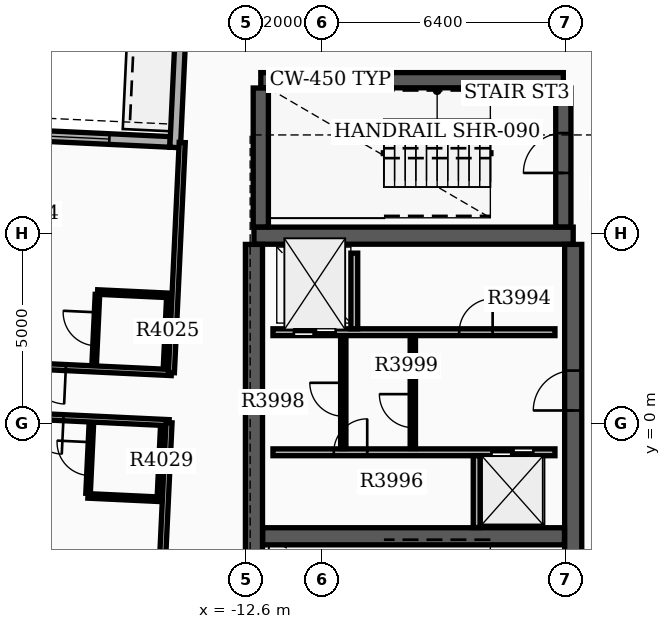
"""IFC4 building model, lengths in metres.
Left out: names, types, materials, properties, quantities, classifications, styles, units other than length and angle.
Written with IfcOpenShell. Run it as: python <this file> out.ifc"""

import sys

from ifc_helpers import new_model, si_unit, direction, frame, frame_2d, origin, place, context, subcontext, project, spatial, rectangle, extrude, element, fill, save


model = new_model("IFC4")
c1 = context("Model", 3, precision=1e-05, world=origin(), true_north=direction((0.0, 1.0)))
c2 = subcontext(c1, "Body", "Model", "MODEL_VIEW")
j1 = project(units=[si_unit("LENGTHUNIT", "METRE"), si_unit("PLANEANGLEUNIT", "RADIAN")], contexts=[c1])
p1 = place(None, origin())
s1 = spatial("IfcSite", under=j1, at=p1, CompositionType="ELEMENT")
p2 = place(p1, origin())
s2 = spatial("IfcBuilding", under=s1, at=p2, CompositionType="ELEMENT")
p3 = place(p2, frame((0.0, 0.0, 253.8)))
s3 = spatial("IfcBuildingStorey", under=s2, at=p3, CompositionType="ELEMENT", Elevation=253.8)
p4 = place(p3, frame((-12.4, 4.95, 0.0), z_axis=(0.0, 0.0, 1.0), x_axis=(1.0, 0.0, 0.0)))
e1 = element("IfcWall", 1, at=p4, inside=s3, PredefinedType="SHEAR", context=c2, shape_type="SweptSolid", body=[
    extrude(rectangle(XDim=8.4, YDim=0.45, at=frame_2d((4.2, 0.0))), origin(), (0.0, 0.0, 1.0), 3.7),
])
p5 = place(p3, frame((-12.4, -6.62, 0.0), z_axis=(0.0, 0.0, 1.0), x_axis=(0.0, 1.0, 0.0)))
e2 = element("IfcWall", 2, at=p5, inside=s3, PredefinedType="SHEAR", context=c2, shape_type="SweptSolid", body=[
    extrude(rectangle(XDim=11.34, YDim=0.45, at=frame_2d((5.67, 0.0))), origin(), (0.0, 0.0, 1.0), 3.7),
])
p6 = place(p3, frame((-4.0, -6.62, 0.0), z_axis=(0.0, 0.0, 1.0), x_axis=(0.0, 1.0, 0.0)))
e3 = element("IfcWall", 3, at=p6, inside=s3, PredefinedType="SHEAR", context=c2, shape_type="SweptSolid", body=[
    extrude(rectangle(XDim=11.34, YDim=0.45, at=frame_2d((5.67, 0.0))), origin(), (0.0, 0.0, 1.0), 3.7),
])
p7 = place(p6, frame((1.37, 0.0, 0.0)))
e4 = element("IfcOpeningElement", 4, at=p7, cuts=e3, PredefinedType="OPENING", context=c2, shape_type="SweptSolid", body=[
    extrude(rectangle(XDim=1.05, YDim=2.15, at=frame_2d((0.525, 1.075))), frame((0.0, 0.235, 0.0), z_axis=(0.0, -1.0, 0.0), x_axis=(1.0, 0.0, 0.0)), (0.0, 0.0, 1.0), 0.47),
])
p8 = place(p6, frame((6.97, 0.0, 0.0)))
e5 = element("IfcOpeningElement", 5, at=p8, cuts=e3, PredefinedType="OPENING", context=c2, shape_type="SweptSolid", body=[
    extrude(rectangle(XDim=1.05, YDim=2.15, at=frame_2d((0.525, 1.075))), frame((0.0, 0.235, 0.0), z_axis=(0.0, -1.0, 0.0), x_axis=(1.0, 0.0, 0.0)), (0.0, 0.0, 1.0), 0.47),
])
p9 = place(p3, frame((-12.17, -2.96, 0.0), z_axis=(0.0, 0.0, 1.0), x_axis=(1.0, 0.0, 0.0)))
e6 = element("IfcWall", 6, at=p9, inside=s3, PredefinedType="SHEAR", context=c2, shape_type="SweptSolid", body=[
    extrude(rectangle(XDim=7.94, YDim=0.45, at=frame_2d((3.97, 0.0))), origin(), (0.0, 0.0, 1.0), 3.7),
])
p10 = place(p3, frame((-12.22, 9.04, 0.0), z_axis=(0.0, 0.0, 1.0), x_axis=(1.0, 0.0, 0.0)))
e7 = element("IfcWall", 7, at=p10, inside=s3, PredefinedType="SHEAR", context=c2, shape_type="SweptSolid", body=[
    extrude(rectangle(XDim=7.96, YDim=0.4, at=frame_2d((3.98, 0.0))), origin(), (0.0, 0.0, 1.0), 3.7),
])
p11 = place(p3, frame((-12.22, 5.18, 0.0), z_axis=(0.0, 0.0, 1.0), x_axis=(0.0, 1.0, 0.0)))
e8 = element("IfcWall", 8, at=p11, inside=s3, PredefinedType="SHEAR", context=c2, shape_type="SweptSolid", body=[
    extrude(rectangle(XDim=3.655, YDim=0.4, at=frame_2d((1.828, 0.0))), origin(), (0.0, 0.0, 1.0), 3.7),
])
p12 = place(p3, frame((-4.26, 5.18, 0.0), z_axis=(0.0, 0.0, 1.0), x_axis=(0.0, 1.0, 0.0)))
e9 = element("IfcWall", 9, at=p12, inside=s3, PredefinedType="SHEAR", context=c2, shape_type="SweptSolid", body=[
    extrude(rectangle(XDim=3.655, YDim=0.4, at=frame_2d((1.828, 0.0))), origin(), (0.0, 0.0, 1.0), 3.7),
])
p13 = place(p12, frame((1.42, 0.0, 0.0)))
e10 = element("IfcOpeningElement", 10, at=p13, cuts=e9, PredefinedType="OPENING", context=c2, shape_type="SweptSolid", body=[
    extrude(rectangle(XDim=1.05, YDim=2.15, at=frame_2d((0.525, 1.075))), frame((0.0, 0.21, 0.0), z_axis=(0.0, -1.0, 0.0), x_axis=(1.0, 0.0, 0.0)), (0.0, 0.0, 1.0), 0.42),
])
p14 = place(p3, frame((-14.607, 7.416, 0.0), z_axis=(0.0, 0.0, 1.0), x_axis=(-0.998889342735, 0.047117735191, 0.0)))
e11 = element("IfcWall", 11, at=p14, inside=s3, PredefinedType="STANDARD", context=c2, shape_type="SweptSolid", body=[
    extrude(rectangle(XDim=14.7, YDim=0.28, at=frame_2d((7.35, 0.0))), origin(), (0.0, 0.0, 1.0), 3.18),
])
p15 = place(p14, frame((1.6, 0.0, 0.8)))
e12 = element("IfcOpeningElement", 12, at=p15, cuts=e11, PredefinedType="OPENING", context=c2, shape_type="SweptSolid", body=[
    extrude(rectangle(XDim=1.6, YDim=1.7, at=frame_2d((0.8, 0.85))), frame((0.0, 0.15, 0.0), z_axis=(0.0, -1.0, 0.0), x_axis=(1.0, 0.0, 0.0)), (0.0, 0.0, 1.0), 0.3),
])
p16 = place(p14, frame((4.8, 0.0, 0.8)))
e13 = element("IfcOpeningElement", 13, at=p16, cuts=e11, PredefinedType="OPENING", context=c2, shape_type="SweptSolid", body=[
    extrude(rectangle(XDim=1.6, YDim=1.7, at=frame_2d((0.8, 0.85))), frame((0.0, 0.15, 0.0), z_axis=(0.0, -1.0, 0.0), x_axis=(1.0, 0.0, 0.0)), (0.0, 0.0, 1.0), 0.3),
])
p17 = place(p14, frame((8.25, 0.0, 0.8)))
e14 = element("IfcOpeningElement", 14, at=p17, cuts=e11, PredefinedType="OPENING", context=c2, shape_type="SweptSolid", body=[
    extrude(rectangle(XDim=1.6, YDim=1.7, at=frame_2d((0.8, 0.85))), frame((0.0, 0.15, 0.0), z_axis=(0.0, -1.0, 0.0), x_axis=(1.0, 0.0, 0.0)), (0.0, 0.0, 1.0), 0.3),
])
p18 = place(p14, frame((11.45, 0.0, 0.8)))
e15 = element("IfcOpeningElement", 15, at=p18, cuts=e11, PredefinedType="OPENING", context=c2, shape_type="SweptSolid", body=[
    extrude(rectangle(XDim=1.6, YDim=1.7, at=frame_2d((0.8, 0.85))), frame((0.0, 0.15, 0.0), z_axis=(0.0, -1.0, 0.0), x_axis=(1.0, 0.0, 0.0)), (0.0, 0.0, 1.0), 0.3),
])
p19 = place(p3, frame((-14.474, 7.27, 0.0), z_axis=(0.0, 0.0, 1.0), x_axis=(0.04712043756, 0.998889215261, 0.0)))
e16 = element("IfcWall", 16, at=p19, inside=s3, PredefinedType="STANDARD", context=c2, shape_type="SweptSolid", body=[
    extrude(rectangle(XDim=6.86, YDim=0.28, at=frame_2d((3.43, 0.0))), origin(), (0.0, 0.0, 1.0), 3.18),
])
p20 = place(p3, frame((-11.9, 2.41, 0.0), z_axis=(0.0, 0.0, 1.0), x_axis=(1.0, 0.0, 0.0)))
e17 = element("IfcWall", 17, at=p20, inside=s3, PredefinedType="SOLIDWALL", context=c2, shape_type="SweptSolid", body=[
    extrude(rectangle(XDim=7.42, YDim=0.18, at=frame_2d((3.71, 0.0))), origin(), (0.0, 0.0, 1.0), 3.17),
])
p21 = place(p20, frame((0.55, 0.0, 0.0)))
e18 = element("IfcOpeningElement", 18, at=p21, cuts=e17, PredefinedType="OPENING", context=c2, shape_type="SweptSolid", body=[
    extrude(rectangle(XDim=1.1, YDim=2.15, at=frame_2d((0.55, 1.075))), frame((0.0, 0.1, 0.0), z_axis=(0.0, -1.0, 0.0), x_axis=(1.0, 0.0, 0.0)), (0.0, 0.0, 1.0), 0.2),
])
p22 = place(p20, frame((4.9, 0.0, 0.0)))
e19 = element("IfcOpeningElement", 19, at=p22, cuts=e17, PredefinedType="OPENING", context=c2, shape_type="SweptSolid", body=[
    extrude(rectangle(XDim=0.88, YDim=2.1, at=frame_2d((0.44, 1.05))), frame((0.0, 0.1, 0.0), z_axis=(0.0, -1.0, 0.0), x_axis=(1.0, 0.0, 0.0)), (0.0, 0.0, 1.0), 0.2),
])
p23 = place(p3, frame((-11.9, -0.75, 0.0), z_axis=(0.0, 0.0, 1.0), x_axis=(1.0, 0.0, 0.0)))
e20 = element("IfcWall", 20, at=p23, inside=s3, PredefinedType="SOLIDWALL", context=c2, shape_type="SweptSolid", body=[
    extrude(rectangle(XDim=7.42, YDim=0.18, at=frame_2d((3.71, 0.0))), origin(), (0.0, 0.0, 1.0), 3.17),
])
p24 = place(p23, frame((5.75, 0.0, 0.0)))
e21 = element("IfcOpeningElement", 21, at=p24, cuts=e20, PredefinedType="OPENING", context=c2, shape_type="SweptSolid", body=[
    extrude(rectangle(XDim=1.1, YDim=2.15, at=frame_2d((0.55, 1.075))), frame((0.0, 0.1, 0.0), z_axis=(0.0, -1.0, 0.0), x_axis=(1.0, 0.0, 0.0)), (0.0, 0.0, 1.0), 0.2),
])
p25 = place(p23, frame((1.6, 0.0, 0.0)))
e22 = element("IfcOpeningElement", 22, at=p25, cuts=e20, PredefinedType="OPENING", context=c2, shape_type="SweptSolid", body=[
    extrude(rectangle(XDim=0.88, YDim=2.1, at=frame_2d((0.44, 1.05))), frame((0.0, 0.1, 0.0), z_axis=(0.0, -1.0, 0.0), x_axis=(1.0, 0.0, 0.0)), (0.0, 0.0, 1.0), 0.2),
])
p26 = place(p3, frame((-9.76, 2.5, 0.0), z_axis=(0.0, 0.0, 1.0), x_axis=(0.0, 1.0, 0.0)))
e23 = element("IfcWall", 23, at=p26, inside=s3, PredefinedType="SOLIDWALL", context=c2, shape_type="SweptSolid", body=[
    extrude(rectangle(XDim=1.99, YDim=0.18, at=frame_2d((0.995, 0.0))), origin(), (0.0, 0.0, 1.0), 3.17),
])
p27 = place(p3, frame((-6.54, -2.73, 0.0), z_axis=(0.0, 0.0, 1.0), x_axis=(0.0, 1.0, 0.0)))
e24 = element("IfcWall", 24, at=p27, inside=s3, PredefinedType="SOLIDWALL", context=c2, shape_type="SweptSolid", body=[
    extrude(rectangle(XDim=1.89, YDim=0.18, at=frame_2d((0.945, 0.0))), origin(), (0.0, 0.0, 1.0), 3.17),
])
p28 = place(p3, frame((-8.22, -0.65, 0.0), z_axis=(0.0, 0.0, 1.0), x_axis=(0.0, 1.0, 0.0)))
e25 = element("IfcWall", 25, at=p28, inside=s3, PredefinedType="SOLIDWALL", context=c2, shape_type="SweptSolid", body=[
    extrude(rectangle(XDim=2.96, YDim=0.14, at=frame_2d((1.48, 0.0))), origin(), (0.0, 0.0, 1.0), 3.17),
])
p29 = place(p28, frame((0.55, 0.0, 0.0)))
e26 = element("IfcOpeningElement", 26, at=p29, cuts=e25, PredefinedType="OPENING", context=c2, shape_type="SweptSolid", body=[
    extrude(rectangle(XDim=0.88, YDim=2.1, at=frame_2d((0.44, 1.05))), frame((0.0, 0.08, 0.0), z_axis=(0.0, -1.0, 0.0), x_axis=(1.0, 0.0, 0.0)), (0.0, 0.0, 1.0), 0.16),
])
p30 = place(p3, frame((-10.05, -0.652, 0.0), z_axis=(0.0, 0.0, 1.0), x_axis=(0.0, 1.0, 0.0)))
e27 = element("IfcWall", 27, at=p30, inside=s3, PredefinedType="PARTITIONING", context=c2, shape_type="SweptSolid", body=[
    extrude(rectangle(XDim=2.962, YDim=0.14, at=frame_2d((1.481, 0.0))), origin(), (0.0, 0.0, 1.0), 3.17),
])
p31 = place(p30, frame((0.85, 0.0, 0.0)))
e28 = element("IfcOpeningElement", 28, at=p31, cuts=e27, PredefinedType="OPENING", context=c2, shape_type="SweptSolid", body=[
    extrude(rectangle(XDim=0.88, YDim=2.1, at=frame_2d((0.44, 1.05))), frame((0.0, 0.08, 0.0), z_axis=(0.0, -1.0, 0.0), x_axis=(1.0, 0.0, 0.0)), (0.0, 0.0, 1.0), 0.16),
])
p32 = place(p3, frame((-14.573, 1.348, 0.0), z_axis=(0.0, 0.0, 1.0), x_axis=(-0.998889523559, 0.047113901593, 0.0)))
e29 = element("IfcWall", 29, at=p32, inside=s3, PredefinedType="PARTITIONING", context=c2, shape_type="SweptSolid", body=[
    extrude(rectangle(XDim=15.012, YDim=0.16, at=frame_2d((7.506, 0.0))), origin(), (0.0, 0.0, 1.0), 3.17),
])
p33 = place(p32, frame((2.78, 0.0, 0.0)))
e30 = element("IfcOpeningElement", 30, at=p33, cuts=e29, PredefinedType="OPENING", context=c2, shape_type="SweptSolid", body=[
    extrude(rectangle(XDim=0.96, YDim=2.15, at=frame_2d((0.48, 1.075))), frame((0.0, 0.09, 0.0), z_axis=(0.0, -1.0, 0.0), x_axis=(1.0, 0.0, 0.0)), (0.0, 0.0, 1.0), 0.18),
])
p34 = place(p32, frame((13.76, 0.0, 0.0)))
e31 = element("IfcOpeningElement", 31, at=p34, cuts=e29, PredefinedType="OPENING", context=c2, shape_type="SweptSolid", body=[
    extrude(rectangle(XDim=0.96, YDim=2.15, at=frame_2d((0.48, 1.075))), frame((0.0, 0.09, 0.0), z_axis=(0.0, -1.0, 0.0), x_axis=(1.0, 0.0, 0.0)), (0.0, 0.0, 1.0), 0.18),
])
p35 = place(p3, frame((-14.573, 1.348, 0.0), z_axis=(0.0, 0.0, 1.0), x_axis=(0.047136383867, 0.998888462901, 0.0)))
e32 = element("IfcWall", 32, at=p35, inside=s3, PredefinedType="PARTITIONING", context=c2, shape_type="SweptSolid", body=[
    extrude(rectangle(XDim=6.06, YDim=0.16, at=frame_2d((3.03, 0.0))), origin(), (0.0, 0.0, 1.0), 3.17),
])
p36 = place(p3, frame((-16.604, 1.584, 0.0), z_axis=(0.0, 0.0, 1.0), x_axis=(0.047087116047, 0.998890786574, 0.0)))
e33 = element("IfcWall", 33, at=p36, inside=s3, PredefinedType="PARTITIONING", context=c2, shape_type="SweptSolid", body=[
    extrude(rectangle(XDim=1.82, YDim=0.12, at=frame_2d((0.91, 0.0))), origin(), (0.0, 0.0, 1.0), 3.17),
])
p37 = place(p36, frame((0.47, 0.0, 0.0)))
e34 = element("IfcOpeningElement", 34, at=p37, cuts=e33, PredefinedType="OPENING", context=c2, shape_type="SweptSolid", body=[
    extrude(rectangle(XDim=0.88, YDim=2.1, at=frame_2d((0.44, 1.05))), frame((0.0, 0.07, 0.0), z_axis=(0.0, -1.0, 0.0), x_axis=(1.0, 0.0, 0.0)), (0.0, 0.0, 1.0), 0.14),
])
p38 = place(p3, frame((-14.726, 1.495, 0.0), z_axis=(0.0, 0.0, 1.0), x_axis=(0.047087116047, 0.998890786574, 0.0)))
e35 = element("IfcWall", 35, at=p38, inside=s3, PredefinedType="PARTITIONING", context=c2, shape_type="SweptSolid", body=[
    extrude(rectangle(XDim=1.82, YDim=0.12, at=frame_2d((0.91, 0.0))), origin(), (0.0, 0.0, 1.0), 3.17),
])
p39 = place(p3, frame((-14.637, 3.378, 0.0), z_axis=(0.0, 0.0, 1.0), x_axis=(-0.998894138717, 0.04701595088, 0.0)))
e36 = element("IfcWall", 36, at=p39, inside=s3, PredefinedType="PARTITIONING", context=c2, shape_type="SweptSolid", body=[
    extrude(rectangle(XDim=1.88, YDim=0.12, at=frame_2d((0.94, 0.0))), origin(), (0.0, 0.0, 1.0), 3.17),
])
p40 = place(p3, frame((-14.635, 0.029, 0.0), z_axis=(0.0, 0.0, 1.0), x_axis=(-0.998889487459, 0.047114666968, 0.0)))
e37 = element("IfcWall", 37, at=p40, inside=s3, PredefinedType="PARTITIONING", context=c2, shape_type="SweptSolid", body=[
    extrude(rectangle(XDim=15.012, YDim=0.16, at=frame_2d((7.506, 0.0))), origin(), (0.0, 0.0, 1.0), 3.17),
])
p41 = place(p40, frame((2.78, 0.0, 0.0)))
e38 = element("IfcOpeningElement", 38, at=p41, cuts=e37, PredefinedType="OPENING", context=c2, shape_type="SweptSolid", body=[
    extrude(rectangle(XDim=0.96, YDim=2.15, at=frame_2d((0.48, 1.075))), frame((0.0, 0.09, 0.0), z_axis=(0.0, -1.0, 0.0), x_axis=(1.0, 0.0, 0.0)), (0.0, 0.0, 1.0), 0.18),
])
p42 = place(p40, frame((13.76, 0.0, 0.0)))
e39 = element("IfcOpeningElement", 39, at=p42, cuts=e37, PredefinedType="OPENING", context=c2, shape_type="SweptSolid", body=[
    extrude(rectangle(XDim=0.96, YDim=2.15, at=frame_2d((0.48, 1.075))), frame((0.0, 0.09, 0.0), z_axis=(0.0, -1.0, 0.0), x_axis=(1.0, 0.0, 0.0)), (0.0, 0.0, 1.0), 0.18),
])
p43 = place(p3, frame((-14.635, 0.029, 0.0), z_axis=(0.0, 0.0, 1.0), x_axis=(-0.047098081119, -0.998890269627, 0.0)))
e40 = element("IfcWall", 40, at=p43, inside=s3, PredefinedType="PARTITIONING", context=c2, shape_type="SweptSolid", body=[
    extrude(rectangle(XDim=6.06, YDim=0.16, at=frame_2d((3.03, 0.0))), origin(), (0.0, 0.0, 1.0), 3.17),
])
p44 = place(p3, frame((-16.765, -1.832, 0.0), z_axis=(0.0, 0.0, 1.0), x_axis=(0.047087116047, 0.998890786574, 0.0)))
e41 = element("IfcWall", 41, at=p44, inside=s3, PredefinedType="PARTITIONING", context=c2, shape_type="SweptSolid", body=[
    extrude(rectangle(XDim=1.82, YDim=0.12, at=frame_2d((0.91, 0.0))), origin(), (0.0, 0.0, 1.0), 3.17),
])
p45 = place(p44, frame((0.47, 0.0, 0.0)))
e42 = element("IfcOpeningElement", 42, at=p45, cuts=e41, PredefinedType="OPENING", context=c2, shape_type="SweptSolid", body=[
    extrude(rectangle(XDim=0.88, YDim=2.1, at=frame_2d((0.44, 1.05))), frame((0.0, 0.07, 0.0), z_axis=(0.0, -1.0, 0.0), x_axis=(1.0, 0.0, 0.0)), (0.0, 0.0, 1.0), 0.14),
])
p46 = place(p3, frame((-14.887, -1.921, 0.0), z_axis=(0.0, 0.0, 1.0), x_axis=(0.047080807099, 0.998891083954, 0.0)))
e43 = element("IfcWall", 43, at=p46, inside=s3, PredefinedType="PARTITIONING", context=c2, shape_type="SweptSolid", body=[
    extrude(rectangle(XDim=1.82, YDim=0.12, at=frame_2d((0.91, 0.0))), origin(), (0.0, 0.0, 1.0), 3.17),
])
p47 = place(p3, frame((-14.89, -1.986, 0.0), z_axis=(0.0, 0.0, 1.0), x_axis=(-0.998888319371, 0.047139425368, 0.0)))
e44 = element("IfcWall", 44, at=p47, inside=s3, PredefinedType="PARTITIONING", context=c2, shape_type="SweptSolid", body=[
    extrude(rectangle(XDim=1.88, YDim=0.12, at=frame_2d((0.94, 0.0))), origin(), (0.0, 0.0, 1.0), 3.17),
])
p48 = place(p15, origin())
e45 = element("IfcWindow", 45, at=p48, inside=s3, PartitioningType="SINGLE_PANEL", PredefinedType="WINDOW", context=c2, shape_type="SweptSolid", body=[
    extrude(rectangle(XDim=1.6, YDim=1.7, at=frame_2d((0.8, 0.85))), frame((0.0, 0.03, 0.0), z_axis=(0.0, -1.0, 0.0), x_axis=(1.0, 0.0, 0.0)), (0.0, 0.0, 1.0), 0.06),
])
fill(e12, e45)
p49 = place(p8, origin())
e46 = element("IfcDoor", 46, at=p49, inside=s3, OperationType="SINGLE_SWING_LEFT", PredefinedType="DOOR", context=c2, shape_type="SweptSolid", body=[
    extrude(rectangle(XDim=1.05, YDim=2.15, at=frame_2d((0.525, 1.075))), frame((0.0, 0.025, 0.0), z_axis=(0.0, -1.0, 0.0), x_axis=(1.0, 0.0, 0.0)), (0.0, 0.0, 1.0), 0.05),
])
fill(e5, e46)
p50 = place(p13, origin())
e47 = element("IfcDoor", 47, at=p50, inside=s3, OperationType="SINGLE_SWING_LEFT", PredefinedType="DOOR", context=c2, shape_type="SweptSolid", body=[
    extrude(rectangle(XDim=1.05, YDim=2.15, at=frame_2d((0.525, 1.075))), frame((0.0, 0.025, 0.0), z_axis=(0.0, -1.0, 0.0), x_axis=(1.0, 0.0, 0.0)), (0.0, 0.0, 1.0), 0.05),
])
fill(e10, e47)
p51 = place(p21, origin())
e48 = element("IfcDoor", 48, at=p51, inside=s3, OperationType="DOUBLE_DOOR_SLIDING", PredefinedType="DOOR", context=c2, shape_type="SweptSolid", body=[
    extrude(rectangle(XDim=1.1, YDim=2.15, at=frame_2d((0.55, 1.075))), frame((0.0, 0.025, 0.0), z_axis=(0.0, -1.0, 0.0), x_axis=(1.0, 0.0, 0.0)), (0.0, 0.0, 1.0), 0.05),
])
fill(e18, e48)
p52 = place(p24, origin())
e49 = element("IfcDoor", 49, at=p52, inside=s3, OperationType="DOUBLE_DOOR_SLIDING", PredefinedType="DOOR", context=c2, shape_type="SweptSolid", body=[
    extrude(rectangle(XDim=1.1, YDim=2.15, at=frame_2d((0.55, 1.075))), frame((0.0, 0.025, 0.0), z_axis=(0.0, -1.0, 0.0), x_axis=(1.0, 0.0, 0.0)), (0.0, 0.0, 1.0), 0.05),
])
fill(e21, e49)
p53 = place(p22, origin())
e50 = element("IfcDoor", 50, at=p53, inside=s3, OperationType="SINGLE_SWING_RIGHT", PredefinedType="DOOR", context=c2, shape_type="SweptSolid", body=[
    extrude(rectangle(XDim=0.88, YDim=2.1, at=frame_2d((0.44, 1.05))), frame((0.0, 0.025, 0.0), z_axis=(0.0, -1.0, 0.0), x_axis=(1.0, 0.0, 0.0)), (0.0, 0.0, 1.0), 0.05),
])
fill(e19, e50)
p54 = place(p25, origin())
e51 = element("IfcDoor", 51, at=p54, inside=s3, OperationType="SINGLE_SWING_RIGHT", PredefinedType="DOOR", context=c2, shape_type="SweptSolid", body=[
    extrude(rectangle(XDim=0.88, YDim=2.1, at=frame_2d((0.44, 1.05))), frame((0.0, 0.025, 0.0), z_axis=(0.0, -1.0, 0.0), x_axis=(1.0, 0.0, 0.0)), (0.0, 0.0, 1.0), 0.05),
])
fill(e22, e51)
p55 = place(p29, origin())
e52 = element("IfcDoor", 52, at=p55, inside=s3, OperationType="SINGLE_SWING_RIGHT", PredefinedType="DOOR", context=c2, shape_type="SweptSolid", body=[
    extrude(rectangle(XDim=0.88, YDim=2.1, at=frame_2d((0.44, 1.05))), frame((0.0, 0.025, 0.0), z_axis=(0.0, -1.0, 0.0), x_axis=(1.0, 0.0, 0.0)), (0.0, 0.0, 1.0), 0.05),
])
fill(e26, e52)
p56 = place(p31, origin())
e53 = element("IfcDoor", 53, at=p56, inside=s3, OperationType="SINGLE_SWING_RIGHT", PredefinedType="DOOR", context=c2, shape_type="SweptSolid", body=[
    extrude(rectangle(XDim=0.88, YDim=2.1, at=frame_2d((0.44, 1.05))), frame((0.0, 0.025, 0.0), z_axis=(0.0, -1.0, 0.0), x_axis=(1.0, 0.0, 0.0)), (0.0, 0.0, 1.0), 0.05),
])
fill(e28, e53)
p57 = place(p33, origin())
e54 = element("IfcDoor", 54, at=p57, inside=s3, OperationType="SINGLE_SWING_LEFT", PredefinedType="DOOR", context=c2, shape_type="SweptSolid", body=[
    extrude(rectangle(XDim=0.96, YDim=2.15, at=frame_2d((0.48, 1.075))), frame((0.0, 0.025, 0.0), z_axis=(0.0, -1.0, 0.0), x_axis=(1.0, 0.0, 0.0)), (0.0, 0.0, 1.0), 0.05),
])
fill(e30, e54)
p58 = place(p37, origin())
e55 = element("IfcDoor", 55, at=p58, inside=s3, OperationType="SINGLE_SWING_RIGHT", PredefinedType="DOOR", context=c2, shape_type="SweptSolid", body=[
    extrude(rectangle(XDim=0.88, YDim=2.1, at=frame_2d((0.44, 1.05))), frame((0.0, 0.025, 0.0), z_axis=(0.0, -1.0, 0.0), x_axis=(1.0, 0.0, 0.0)), (0.0, 0.0, 1.0), 0.05),
])
fill(e34, e55)
p59 = place(p41, origin())
e56 = element("IfcDoor", 56, at=p59, inside=s3, OperationType="SINGLE_SWING_LEFT", PredefinedType="DOOR", context=c2, shape_type="SweptSolid", body=[
    extrude(rectangle(XDim=0.96, YDim=2.15, at=frame_2d((0.48, 1.075))), frame((0.0, 0.025, 0.0), z_axis=(0.0, -1.0, 0.0), x_axis=(1.0, 0.0, 0.0)), (0.0, 0.0, 1.0), 0.05),
])
fill(e38, e56)
p60 = place(p45, origin())
e57 = element("IfcDoor", 57, at=p60, inside=s3, OperationType="SINGLE_SWING_RIGHT", PredefinedType="DOOR", context=c2, shape_type="SweptSolid", body=[
    extrude(rectangle(XDim=0.88, YDim=2.1, at=frame_2d((0.44, 1.05))), frame((0.0, 0.025, 0.0), z_axis=(0.0, -1.0, 0.0), x_axis=(1.0, 0.0, 0.0)), (0.0, 0.0, 1.0), 0.05),
])
fill(e42, e57)
save(model, sys.argv[1])
